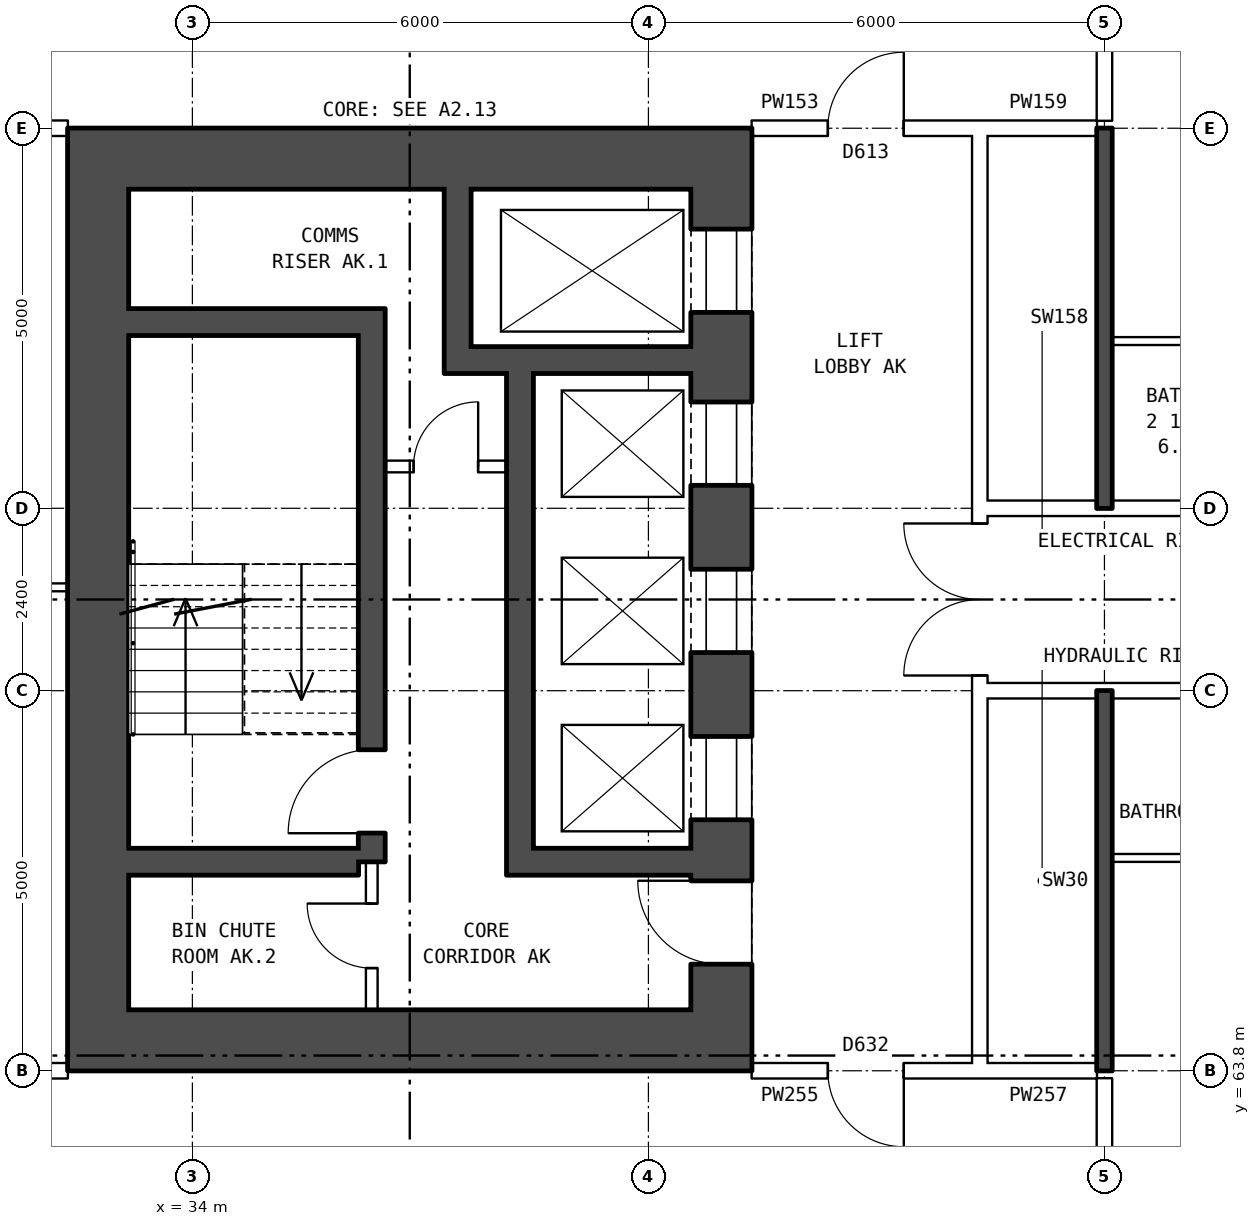
"""IFC4 building model, lengths in metres.
Left out: names, types, materials, properties, quantities, classifications, styles, units other than length and angle.
Written with IfcOpenShell. Run it as: python <this file> out.ifc"""

import sys

from ifc_helpers import new_model, si_unit, direction, frame, frame_2d, origin, place, context, subcontext, project, spatial, rectangle, extrude, element, fill, save


model = new_model("IFC4")
c1 = context("Model", 3, precision=1e-05, world=origin(), true_north=direction((0.0, 1.0)))
c2 = subcontext(c1, "Body", "Model", "MODEL_VIEW")
j1 = project(units=[si_unit("LENGTHUNIT", "METRE"), si_unit("PLANEANGLEUNIT", "RADIAN")], contexts=[c1])
p1 = place(None, origin())
s1 = spatial("IfcSite", under=j1, at=p1, CompositionType="ELEMENT")
p2 = place(p1, origin())
s2 = spatial("IfcBuilding", under=s1, at=p2, CompositionType="ELEMENT")
p3 = place(p2, frame((0.0, 0.0, 47.4)))
s3 = spatial("IfcBuildingStorey", under=s2, at=p3, CompositionType="ELEMENT", Elevation=47.4)
p4 = place(p3, frame((40.96, 75.4, 0.0), z_axis=(0.0, 0.0, 1.0), x_axis=(0.0, -1.0, 0.0)))
e1 = element("IfcWall", 1, at=p4, inside=s3, PredefinedType="SHEAR", context=c2, shape_type="SweptSolid", body=[
    extrude(rectangle(XDim=10.8, YDim=0.8, at=frame_2d((5.4, 0.0))), origin(), (0.0, 0.0, 1.0), 2.85),
])
p5 = place(p4, frame((0.525, 0.0, 0.0)))
e2 = element("IfcOpeningElement", 2, at=p5, cuts=e1, PredefinedType="OPENING", context=c2, shape_type="SweptSolid", body=[
    extrude(rectangle(XDim=1.1, YDim=2.1, at=frame_2d((0.55, 1.05))), frame((0.0, 0.41, 0.0), z_axis=(0.0, -1.0, 0.0), x_axis=(1.0, 0.0, 0.0)), (0.0, 0.0, 1.0), 0.82),
])
p6 = place(p4, frame((2.8, 0.0, 0.0)))
e3 = element("IfcOpeningElement", 3, at=p6, cuts=e1, PredefinedType="OPENING", context=c2, shape_type="SweptSolid", body=[
    extrude(rectangle(XDim=1.1, YDim=2.1, at=frame_2d((0.55, 1.05))), frame((0.0, 0.41, 0.0), z_axis=(0.0, -1.0, 0.0), x_axis=(1.0, 0.0, 0.0)), (0.0, 0.0, 1.0), 0.82),
])
p7 = place(p4, frame((5.0, 0.0, 0.0)))
e4 = element("IfcOpeningElement", 4, at=p7, cuts=e1, PredefinedType="OPENING", context=c2, shape_type="SweptSolid", body=[
    extrude(rectangle(XDim=1.1, YDim=2.1, at=frame_2d((0.55, 1.05))), frame((0.0, 0.41, 0.0), z_axis=(0.0, -1.0, 0.0), x_axis=(1.0, 0.0, 0.0)), (0.0, 0.0, 1.0), 0.82),
])
p8 = place(p4, frame((7.2, 0.0, 0.0)))
e5 = element("IfcOpeningElement", 5, at=p8, cuts=e1, PredefinedType="OPENING", context=c2, shape_type="SweptSolid", body=[
    extrude(rectangle(XDim=1.1, YDim=2.1, at=frame_2d((0.55, 1.05))), frame((0.0, 0.41, 0.0), z_axis=(0.0, -1.0, 0.0), x_axis=(1.0, 0.0, 0.0)), (0.0, 0.0, 1.0), 0.82),
])
p9 = place(p4, frame((9.1, 0.0, 0.0)))
e6 = element("IfcOpeningElement", 6, at=p9, cuts=e1, PredefinedType="OPENING", context=c2, shape_type="SweptSolid", body=[
    extrude(rectangle(XDim=1.1, YDim=2.1, at=frame_2d((0.55, 1.05))), frame((0.0, 0.41, 0.0), z_axis=(0.0, -1.0, 0.0), x_axis=(1.0, 0.0, 0.0)), (0.0, 0.0, 1.0), 0.82),
])
p10 = place(p3, frame((32.76, 75.4, 0.0), z_axis=(0.0, 0.0, 1.0), x_axis=(0.0, -1.0, 0.0)))
e7 = element("IfcWall", 7, at=p10, inside=s3, PredefinedType="SHEAR", context=c2, shape_type="SweptSolid", body=[
    extrude(rectangle(XDim=10.8, YDim=0.8, at=frame_2d((5.4, 0.0))), origin(), (0.0, 0.0, 1.0), 2.85),
])
for number, where, z_axis, x_axis in (
    (8, (41.36, 75.8, 0.0), (0.0, 0.0, 1.0), (-1.0, 0.0, 0.0)),
    (9, (41.36, 64.2, 0.0), (0.0, 0.0, 1.0), (-1.0, 0.0, 0.0)),
):
    element("IfcWall", number, at=place(p3, frame(where, z_axis=z_axis, x_axis=x_axis)), inside=s3, PredefinedType="SHEAR", context=c2, shape_type="SweptSolid", body=[
        extrude(rectangle(XDim=9.0, YDim=0.8, at=frame_2d((4.5, 0.0))), origin(), (0.0, 0.0, 1.0), 2.85),
    ])
p11 = place(p3, frame((36.185, 73.65, 0.0), z_axis=(0.0, 0.0, 1.0), x_axis=(-1.0, 0.0, 0.0)))
e10 = element("IfcWall", 10, at=p11, inside=s3, PredefinedType="SHEAR", context=c2, shape_type="SweptSolid", body=[
    extrude(rectangle(XDim=3.025, YDim=0.35, at=frame_2d((1.513, 0.0))), origin(), (0.0, 0.0, 1.0), 2.85),
])
p12 = place(p3, frame((40.56, 73.15, 0.0), z_axis=(0.0, 0.0, 1.0), x_axis=(-1.0, 0.0, 0.0)))
e11 = element("IfcWall", 11, at=p12, inside=s3, PredefinedType="SHEAR", context=c2, shape_type="SweptSolid", body=[
    extrude(rectangle(XDim=3.245, YDim=0.35, at=frame_2d((1.623, 0.0))), origin(), (0.0, 0.0, 1.0), 2.85),
])
p13 = place(p3, frame((38.135, 71.75, 0.0), z_axis=(0.0, 0.0, 1.0), x_axis=(-1.0, 0.0, 0.0)))
e12 = element("IfcWall", 12, at=p13, inside=s3, PredefinedType="PARTITIONING", context=c2, shape_type="SweptSolid", body=[
    extrude(rectangle(XDim=1.6, YDim=0.15, at=frame_2d((0.8, 0.0))), origin(), (0.0, 0.0, 1.0), 2.85),
])
p14 = place(p13, frame((0.375, 0.0, 0.0)))
e13 = element("IfcOpeningElement", 13, at=p14, cuts=e12, PredefinedType="OPENING", context=c2, shape_type="SweptSolid", body=[
    extrude(rectangle(XDim=0.85, YDim=2.1, at=frame_2d((0.425, 1.05))), frame((0.0, 0.085, 0.0), z_axis=(0.0, -1.0, 0.0), x_axis=(1.0, 0.0, 0.0)), (0.0, 0.0, 1.0), 0.17),
])
p15 = place(p3, frame((40.56, 66.55, 0.0), z_axis=(0.0, 0.0, 1.0), x_axis=(-1.0, 0.0, 0.0)))
e14 = element("IfcWall", 14, at=p15, inside=s3, PredefinedType="SHEAR", context=c2, shape_type="SweptSolid", body=[
    extrude(rectangle(XDim=2.075, YDim=0.35, at=frame_2d((1.038, 0.0))), origin(), (0.0, 0.0, 1.0), 2.85),
])
p16 = place(p3, frame((36.185, 66.55, 0.0), z_axis=(0.0, 0.0, 1.0), x_axis=(-1.0, 0.0, 0.0)))
e15 = element("IfcWall", 15, at=p16, inside=s3, PredefinedType="SHEAR", context=c2, shape_type="SweptSolid", body=[
    extrude(rectangle(XDim=3.025, YDim=0.35, at=frame_2d((1.513, 0.0))), origin(), (0.0, 0.0, 1.0), 2.85),
])
p17 = place(p3, frame((38.31, 72.975, 0.0), z_axis=(0.0, 0.0, 1.0), x_axis=(0.0, -1.0, 0.0)))
e16 = element("IfcWall", 16, at=p17, inside=s3, PredefinedType="SHEAR", context=c2, shape_type="SweptSolid", body=[
    extrude(rectangle(XDim=6.6, YDim=0.35, at=frame_2d((3.3, 0.0))), origin(), (0.0, 0.0, 1.0), 2.85),
])
p18 = place(p3, frame((37.49, 75.4, 0.0), z_axis=(0.0, 0.0, 1.0), x_axis=(0.0, -1.0, 0.0)))
e17 = element("IfcWall", 17, at=p18, inside=s3, PredefinedType="SHEAR", context=c2, shape_type="SweptSolid", body=[
    extrude(rectangle(XDim=2.075, YDim=0.35, at=frame_2d((1.038, 0.0))), origin(), (0.0, 0.0, 1.0), 2.85),
])
p19 = place(p3, frame((36.36, 73.825, 0.0), z_axis=(0.0, 0.0, 1.0), x_axis=(0.0, -1.0, 0.0)))
e18 = element("IfcWall", 18, at=p19, inside=s3, PredefinedType="SHEAR", context=c2, shape_type="SweptSolid", body=[
    extrude(rectangle(XDim=7.275, YDim=0.35, at=frame_2d((3.637, 0.0))), origin(), (0.0, 0.0, 1.0), 2.85),
])
p20 = place(p19, frame((5.8, 0.0, 0.0)))
e19 = element("IfcOpeningElement", 19, at=p20, cuts=e18, PredefinedType="OPENING", context=c2, shape_type="SweptSolid", body=[
    extrude(rectangle(XDim=1.1, YDim=2.1, at=frame_2d((0.55, 1.05))), frame((0.0, 0.185, 0.0), z_axis=(0.0, -1.0, 0.0), x_axis=(1.0, 0.0, 0.0)), (0.0, 0.0, 1.0), 0.37),
])
p21 = place(p3, frame((36.36, 66.55, 0.0), z_axis=(0.0, 0.0, 1.0), x_axis=(0.0, -1.0, 0.0)))
e20 = element("IfcWall", 20, at=p21, inside=s3, PredefinedType="PARTITIONING", context=c2, shape_type="SweptSolid", body=[
    extrude(rectangle(XDim=1.95, YDim=0.15, at=frame_2d((0.975, 0.0))), origin(), (0.0, 0.0, 1.0), 2.85),
])
p22 = place(p21, frame((0.55, 0.0, 0.0)))
e21 = element("IfcOpeningElement", 21, at=p22, cuts=e20, PredefinedType="OPENING", context=c2, shape_type="SweptSolid", body=[
    extrude(rectangle(XDim=0.85, YDim=2.1, at=frame_2d((0.425, 1.05))), frame((0.0, 0.085, 0.0), z_axis=(0.0, -1.0, 0.0), x_axis=(1.0, 0.0, 0.0)), (0.0, 0.0, 1.0), 0.17),
])
p23 = place(p3, frame((44.36, 63.9, 0.0), z_axis=(0.0, 0.0, 1.0), x_axis=(0.0, 1.0, 0.0)))
e22 = element("IfcWall", 22, at=p23, inside=s3, PredefinedType="PARTITIONING", context=c2, shape_type="SweptSolid", body=[
    extrude(rectangle(XDim=12.2, YDim=0.2, at=frame_2d((6.1, 0.0))), origin(), (0.0, 0.0, 1.0), 2.85),
])
p24 = place(p23, frame((5.1, 0.0, 0.0)))
e23 = element("IfcOpeningElement", 23, at=p24, cuts=e22, PredefinedType="OPENING", context=c2, shape_type="SweptSolid", body=[
    extrude(rectangle(XDim=2.0, YDim=2.1, at=frame_2d((1.0, 1.05))), frame((0.0, 0.11, 0.0), z_axis=(0.0, -1.0, 0.0), x_axis=(1.0, 0.0, 0.0)), (0.0, 0.0, 1.0), 0.22),
])
p25 = place(p3, frame((24.26, 63.8, 0.0), z_axis=(0.0, 0.0, 1.0), x_axis=(1.0, 0.0, 0.0)))
e24 = element("IfcWall", 24, at=p25, inside=s3, PredefinedType="PARTITIONING", context=c2, shape_type="SweptSolid", body=[
    extrude(rectangle(XDim=8.1, YDim=0.2, at=frame_2d((4.05, 0.0))), origin(), (0.0, 0.0, 1.0), 2.85),
])
p26 = place(p25, frame((5.52, 0.0, 0.0)))
e25 = element("IfcOpeningElement", 25, at=p26, cuts=e24, PredefinedType="OPENING", context=c2, shape_type="SweptSolid", body=[
    extrude(rectangle(XDim=0.8, YDim=2.1, at=frame_2d((0.4, 1.05))), frame((0.0, 0.11, 0.0), z_axis=(0.0, -1.0, 0.0), x_axis=(1.0, 0.0, 0.0)), (0.0, 0.0, 1.0), 0.22),
])
p27 = place(p3, frame((41.36, 63.8, 0.0), z_axis=(0.0, 0.0, 1.0), x_axis=(1.0, 0.0, 0.0)))
e26 = element("IfcWall", 26, at=p27, inside=s3, PredefinedType="PARTITIONING", context=c2, shape_type="SweptSolid", body=[
    extrude(rectangle(XDim=3.0, YDim=0.2, at=frame_2d((1.5, 0.0))), origin(), (0.0, 0.0, 1.0), 2.85),
])
p28 = place(p27, frame((1.0, 0.0, 0.0)))
e27 = element("IfcOpeningElement", 27, at=p28, cuts=e26, PredefinedType="OPENING", context=c2, shape_type="SweptSolid", body=[
    extrude(rectangle(XDim=1.0, YDim=2.1, at=frame_2d((0.5, 1.05))), frame((0.0, 0.11, 0.0), z_axis=(0.0, -1.0, 0.0), x_axis=(1.0, 0.0, 0.0)), (0.0, 0.0, 1.0), 0.22),
])
p29 = place(p3, frame((44.36, 63.8, 0.0), z_axis=(0.0, 0.0, 1.0), x_axis=(1.0, 0.0, 0.0)))
e28 = element("IfcWall", 28, at=p29, inside=s3, PredefinedType="PARTITIONING", context=c2, shape_type="SweptSolid", body=[
    extrude(rectangle(XDim=1.54, YDim=0.2, at=frame_2d((0.77, 0.0))), origin(), (0.0, 0.0, 1.0), 2.85),
])
p30 = place(p3, frame((46.1, 66.6, 0.0), z_axis=(0.0, 0.0, 1.0), x_axis=(1.0, 0.0, 0.0)))
e29 = element("IfcWall", 29, at=p30, inside=s3, PredefinedType="PARTITIONING", context=c2, shape_type="SweptSolid", body=[
    extrude(rectangle(XDim=2.9, YDim=0.1, at=frame_2d((1.45, 0.0))), origin(), (0.0, 0.0, 1.0), 2.85),
])
p31 = place(p3, frame((44.36, 68.8, 0.0), z_axis=(0.0, 0.0, 1.0), x_axis=(1.0, 0.0, 0.0)))
e30 = element("IfcWall", 30, at=p31, inside=s3, PredefinedType="PARTITIONING", context=c2, shape_type="SweptSolid", body=[
    extrude(rectangle(XDim=19.28, YDim=0.2, at=frame_2d((9.64, 0.0))), origin(), (0.0, 0.0, 1.0), 2.85),
])
p32 = place(p31, frame((14.64, 0.0, 0.0)))
e31 = element("IfcOpeningElement", 31, at=p32, cuts=e30, PredefinedType="OPENING", context=c2, shape_type="SweptSolid", body=[
    extrude(rectangle(XDim=1.0, YDim=2.1, at=frame_2d((0.5, 1.05))), frame((0.0, 0.11, 0.0), z_axis=(0.0, -1.0, 0.0), x_axis=(1.0, 0.0, 0.0)), (0.0, 0.0, 1.0), 0.22),
])
p33 = place(p31, frame((5.64, 0.0, 0.0)))
e32 = element("IfcOpeningElement", 32, at=p33, cuts=e30, PredefinedType="OPENING", context=c2, shape_type="SweptSolid", body=[
    extrude(rectangle(XDim=1.0, YDim=2.1, at=frame_2d((0.5, 1.05))), frame((0.0, 0.11, 0.0), z_axis=(0.0, -1.0, 0.0), x_axis=(1.0, 0.0, 0.0)), (0.0, 0.0, 1.0), 0.22),
])
p34 = place(p3, frame((28.1, 70.16, 0.0), z_axis=(0.0, 0.0, 1.0), x_axis=(1.0, 0.0, 0.0)))
e33 = element("IfcWall", 33, at=p34, inside=s3, PredefinedType="PARTITIONING", context=c2, shape_type="SweptSolid", body=[
    extrude(rectangle(XDim=4.26, YDim=0.1, at=frame_2d((2.13, 0.0))), origin(), (0.0, 0.0, 1.0), 2.85),
])
p35 = place(p3, frame((44.36, 71.2, 0.0), z_axis=(0.0, 0.0, 1.0), x_axis=(1.0, 0.0, 0.0)))
e34 = element("IfcWall", 34, at=p35, inside=s3, PredefinedType="PARTITIONING", context=c2, shape_type="SweptSolid", body=[
    extrude(rectangle(XDim=19.28, YDim=0.2, at=frame_2d((9.64, 0.0))), origin(), (0.0, 0.0, 1.0), 2.85),
])
p36 = place(p35, frame((14.64, 0.0, 0.0)))
e35 = element("IfcOpeningElement", 35, at=p36, cuts=e34, PredefinedType="OPENING", context=c2, shape_type="SweptSolid", body=[
    extrude(rectangle(XDim=1.0, YDim=2.1, at=frame_2d((0.5, 1.05))), frame((0.0, 0.11, 0.0), z_axis=(0.0, -1.0, 0.0), x_axis=(1.0, 0.0, 0.0)), (0.0, 0.0, 1.0), 0.22),
])
p37 = place(p35, frame((5.64, 0.0, 0.0)))
e36 = element("IfcOpeningElement", 36, at=p37, cuts=e34, PredefinedType="OPENING", context=c2, shape_type="SweptSolid", body=[
    extrude(rectangle(XDim=1.0, YDim=2.1, at=frame_2d((0.5, 1.05))), frame((0.0, 0.11, 0.0), z_axis=(0.0, -1.0, 0.0), x_axis=(1.0, 0.0, 0.0)), (0.0, 0.0, 1.0), 0.22),
])
p38 = place(p3, frame((46.1, 73.4, 0.0), z_axis=(0.0, 0.0, 1.0), x_axis=(1.0, 0.0, 0.0)))
e37 = element("IfcWall", 37, at=p38, inside=s3, PredefinedType="PARTITIONING", context=c2, shape_type="SweptSolid", body=[
    extrude(rectangle(XDim=2.9, YDim=0.1, at=frame_2d((1.45, 0.0))), origin(), (0.0, 0.0, 1.0), 2.85),
])
p39 = place(p3, frame((24.26, 76.2, 0.0), z_axis=(0.0, 0.0, 1.0), x_axis=(1.0, 0.0, 0.0)))
e38 = element("IfcWall", 38, at=p39, inside=s3, PredefinedType="PARTITIONING", context=c2, shape_type="SweptSolid", body=[
    extrude(rectangle(XDim=8.1, YDim=0.2, at=frame_2d((4.05, 0.0))), origin(), (0.0, 0.0, 1.0), 2.85),
])
p40 = place(p39, frame((5.52, 0.0, 0.0)))
e39 = element("IfcOpeningElement", 39, at=p40, cuts=e38, PredefinedType="OPENING", context=c2, shape_type="SweptSolid", body=[
    extrude(rectangle(XDim=0.8, YDim=2.1, at=frame_2d((0.4, 1.05))), frame((0.0, 0.11, 0.0), z_axis=(0.0, -1.0, 0.0), x_axis=(1.0, 0.0, 0.0)), (0.0, 0.0, 1.0), 0.22),
])
p41 = place(p3, frame((41.36, 76.2, 0.0), z_axis=(0.0, 0.0, 1.0), x_axis=(1.0, 0.0, 0.0)))
e40 = element("IfcWall", 40, at=p41, inside=s3, PredefinedType="PARTITIONING", context=c2, shape_type="SweptSolid", body=[
    extrude(rectangle(XDim=3.0, YDim=0.2, at=frame_2d((1.5, 0.0))), origin(), (0.0, 0.0, 1.0), 2.85),
])
p42 = place(p41, frame((1.0, 0.0, 0.0)))
e41 = element("IfcOpeningElement", 41, at=p42, cuts=e40, PredefinedType="OPENING", context=c2, shape_type="SweptSolid", body=[
    extrude(rectangle(XDim=1.0, YDim=2.1, at=frame_2d((0.5, 1.05))), frame((0.0, 0.11, 0.0), z_axis=(0.0, -1.0, 0.0), x_axis=(1.0, 0.0, 0.0)), (0.0, 0.0, 1.0), 0.22),
])
p43 = place(p3, frame((44.36, 76.2, 0.0), z_axis=(0.0, 0.0, 1.0), x_axis=(1.0, 0.0, 0.0)))
e42 = element("IfcWall", 42, at=p43, inside=s3, PredefinedType="PARTITIONING", context=c2, shape_type="SweptSolid", body=[
    extrude(rectangle(XDim=1.54, YDim=0.2, at=frame_2d((0.77, 0.0))), origin(), (0.0, 0.0, 1.0), 2.85),
])
p44 = place(p3, frame((46.0, 61.5, 0.0), z_axis=(0.0, 0.0, 1.0), x_axis=(0.0, 1.0, 0.0)))
e43 = element("IfcWall", 43, at=p44, inside=s3, PredefinedType="PARTITIONING", context=c2, shape_type="SweptSolid", body=[
    extrude(rectangle(XDim=2.2, YDim=0.2, at=frame_2d((1.1, 0.0))), origin(), (0.0, 0.0, 1.0), 2.85),
])
for number, where, z_axis, x_axis in (
    (44, (46.0, 63.8, 0.0), (0.0, 0.0, 1.0), (0.0, 1.0, 0.0)),
    (45, (46.0, 71.2, 0.0), (0.0, 0.0, 1.0), (0.0, 1.0, 0.0)),
):
    element("IfcWall", number, at=place(p3, frame(where, z_axis=z_axis, x_axis=x_axis)), inside=s3, PredefinedType="SOLIDWALL", context=c2, shape_type="SweptSolid", body=[
        extrude(rectangle(XDim=5.0, YDim=0.2, at=frame_2d((2.5, 0.0))), origin(), (0.0, 0.0, 1.0), 2.85),
    ])
p45 = place(p3, frame((46.0, 76.3, 0.0), z_axis=(0.0, 0.0, 1.0), x_axis=(0.0, 1.0, 0.0)))
e46 = element("IfcWall", 46, at=p45, inside=s3, PredefinedType="PARTITIONING", context=c2, shape_type="SweptSolid", body=[
    extrude(rectangle(XDim=2.2, YDim=0.2, at=frame_2d((1.1, 0.0))), origin(), (0.0, 0.0, 1.0), 2.85),
])
p46 = place(p5, origin())
e47 = element("IfcDoor", 47, at=p46, inside=s3, OperationType="DOUBLE_DOOR_SLIDING", PredefinedType="DOOR", context=c2, shape_type="SweptSolid", body=[
    extrude(rectangle(XDim=1.1, YDim=2.1, at=frame_2d((0.55, 1.05))), frame((0.0, -0.335, 0.0), z_axis=(0.0, -1.0, 0.0), x_axis=(1.0, 0.0, 0.0)), (0.0, 0.0, 1.0), 0.05),
])
fill(e2, e47)
p47 = place(p6, origin())
e48 = element("IfcDoor", 48, at=p47, inside=s3, OperationType="DOUBLE_DOOR_SLIDING", PredefinedType="DOOR", context=c2, shape_type="SweptSolid", body=[
    extrude(rectangle(XDim=1.1, YDim=2.1, at=frame_2d((0.55, 1.05))), frame((0.0, -0.335, 0.0), z_axis=(0.0, -1.0, 0.0), x_axis=(1.0, 0.0, 0.0)), (0.0, 0.0, 1.0), 0.05),
])
fill(e3, e48)
p48 = place(p7, origin())
e49 = element("IfcDoor", 49, at=p48, inside=s3, OperationType="DOUBLE_DOOR_SLIDING", PredefinedType="DOOR", context=c2, shape_type="SweptSolid", body=[
    extrude(rectangle(XDim=1.1, YDim=2.1, at=frame_2d((0.55, 1.05))), frame((0.0, -0.335, 0.0), z_axis=(0.0, -1.0, 0.0), x_axis=(1.0, 0.0, 0.0)), (0.0, 0.0, 1.0), 0.05),
])
fill(e4, e49)
p49 = place(p8, origin())
e50 = element("IfcDoor", 50, at=p49, inside=s3, OperationType="DOUBLE_DOOR_SLIDING", PredefinedType="DOOR", context=c2, shape_type="SweptSolid", body=[
    extrude(rectangle(XDim=1.1, YDim=2.1, at=frame_2d((0.55, 1.05))), frame((0.0, -0.335, 0.0), z_axis=(0.0, -1.0, 0.0), x_axis=(1.0, 0.0, 0.0)), (0.0, 0.0, 1.0), 0.05),
])
fill(e5, e50)
p50 = place(p9, frame((1.1, 0.0, 0.0), z_axis=(0.0, 0.0, 1.0), x_axis=(-1.0, 0.0, 0.0)))
e51 = element("IfcDoor", 51, at=p50, inside=s3, OperationType="SINGLE_SWING_RIGHT", PredefinedType="DOOR", context=c2, shape_type="SweptSolid", body=[
    extrude(rectangle(XDim=1.1, YDim=2.1, at=frame_2d((0.55, 1.05))), frame((0.0, 0.385, 0.0), z_axis=(0.0, -1.0, 0.0), x_axis=(1.0, 0.0, 0.0)), (0.0, 0.0, 1.0), 0.05),
])
fill(e6, e51)
p51 = place(p20, frame((1.1, 0.0, 0.0), z_axis=(0.0, 0.0, 1.0), x_axis=(-1.0, 0.0, 0.0)))
e52 = element("IfcDoor", 52, at=p51, inside=s3, OperationType="SINGLE_SWING_LEFT", PredefinedType="DOOR", context=c2, shape_type="SweptSolid", body=[
    extrude(rectangle(XDim=1.1, YDim=2.1, at=frame_2d((0.55, 1.05))), frame((0.0, 0.025, 0.0), z_axis=(0.0, -1.0, 0.0), x_axis=(1.0, 0.0, 0.0)), (0.0, 0.0, 1.0), 0.05),
])
fill(e19, e52)
p52 = place(p14, frame((0.85, 0.0, 0.0), z_axis=(0.0, 0.0, 1.0), x_axis=(-1.0, 0.0, 0.0)))
e53 = element("IfcDoor", 53, at=p52, inside=s3, OperationType="SINGLE_SWING_RIGHT", PredefinedType="DOOR", context=c2, shape_type="SweptSolid", body=[
    extrude(rectangle(XDim=0.85, YDim=2.1, at=frame_2d((0.425, 1.05))), frame((0.0, 0.025, 0.0), z_axis=(0.0, -1.0, 0.0), x_axis=(1.0, 0.0, 0.0)), (0.0, 0.0, 1.0), 0.05),
])
fill(e13, e53)
p53 = place(p22, frame((0.85, 0.0, 0.0), z_axis=(0.0, 0.0, 1.0), x_axis=(-1.0, 0.0, 0.0)))
e54 = element("IfcDoor", 54, at=p53, inside=s3, OperationType="SINGLE_SWING_RIGHT", PredefinedType="DOOR", context=c2, shape_type="SweptSolid", body=[
    extrude(rectangle(XDim=0.85, YDim=2.1, at=frame_2d((0.425, 1.05))), frame((0.0, 0.025, 0.0), z_axis=(0.0, -1.0, 0.0), x_axis=(1.0, 0.0, 0.0)), (0.0, 0.0, 1.0), 0.05),
])
fill(e21, e54)
p54 = place(p24, origin())
e55 = element("IfcDoor", 55, at=p54, inside=s3, OperationType="DOUBLE_DOOR_SINGLE_SWING", PredefinedType="DOOR", context=c2, shape_type="SweptSolid", body=[
    extrude(rectangle(XDim=2.0, YDim=2.1, at=frame_2d((1.0, 1.05))), frame((0.0, 0.025, 0.0), z_axis=(0.0, -1.0, 0.0), x_axis=(1.0, 0.0, 0.0)), (0.0, 0.0, 1.0), 0.05),
])
fill(e23, e55)
p55 = place(p28, frame((1.0, 0.0, 0.0), z_axis=(0.0, 0.0, 1.0), x_axis=(-1.0, 0.0, 0.0)))
e56 = element("IfcDoor", 56, at=p55, inside=s3, OperationType="SINGLE_SWING_LEFT", PredefinedType="DOOR", context=c2, shape_type="SweptSolid", body=[
    extrude(rectangle(XDim=1.0, YDim=2.1, at=frame_2d((0.5, 1.05))), frame((0.0, 0.025, 0.0), z_axis=(0.0, -1.0, 0.0), x_axis=(1.0, 0.0, 0.0)), (0.0, 0.0, 1.0), 0.05),
])
fill(e27, e56)
p56 = place(p42, origin())
e57 = element("IfcDoor", 57, at=p56, inside=s3, OperationType="SINGLE_SWING_RIGHT", PredefinedType="DOOR", context=c2, shape_type="SweptSolid", body=[
    extrude(rectangle(XDim=1.0, YDim=2.1, at=frame_2d((0.5, 1.05))), frame((0.0, 0.025, 0.0), z_axis=(0.0, -1.0, 0.0), x_axis=(1.0, 0.0, 0.0)), (0.0, 0.0, 1.0), 0.05),
])
fill(e41, e57)
save(model, sys.argv[1])
